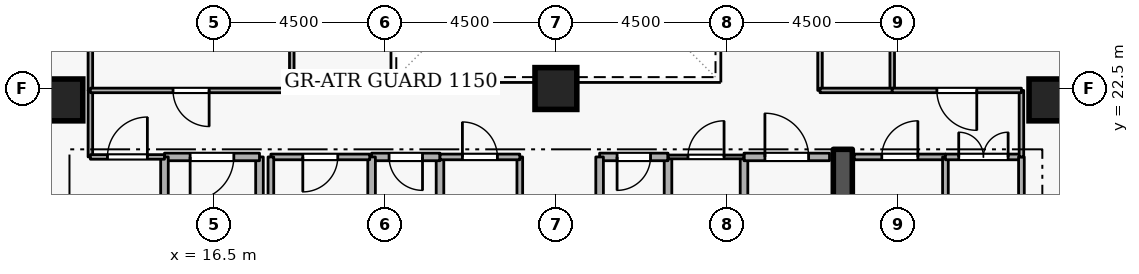
"""IFC4 building model, lengths in metres.
Left out: names, types, materials, properties, quantities, classifications, styles, units other than length and angle.
Written with IfcOpenShell. Run it as: python <this file> out.ifc"""

import sys

from ifc_helpers import new_model, si_unit, direction, frame, frame_2d, origin, origin_2d, place, context, subcontext, project, spatial, rectangle, extrude, element, fill, save


model = new_model("IFC4")
c1 = context("Model", 3, precision=1e-05, world=origin(), true_north=direction((0.0, 1.0)))
c2 = subcontext(c1, "Body", "Model", "MODEL_VIEW")
j1 = project(units=[si_unit("LENGTHUNIT", "METRE"), si_unit("PLANEANGLEUNIT", "RADIAN")], contexts=[c1])
p1 = place(None, origin())
s1 = spatial("IfcSite", under=j1, at=p1, CompositionType="ELEMENT")
p2 = place(p1, origin())
s2 = spatial("IfcBuilding", under=s1, at=p2, CompositionType="ELEMENT")
p3 = place(p2, frame((0.0, 0.0, 192.9)))
s3 = spatial("IfcBuildingStorey", under=s2, at=p3, CompositionType="ELEMENT", Elevation=192.9)
p4 = place(p3, frame((33.05, 15.1, 0.0), z_axis=(0.0, 0.0, 1.0), x_axis=(0.0, 1.0, 0.0)))
e1 = element("IfcWall", 1, at=p4, inside=s3, PredefinedType="SHEAR", context=c2, shape_type="SweptSolid", body=[
    extrude(rectangle(XDim=5.8, YDim=0.5, at=frame_2d((2.9, 0.0))), origin(), (0.0, 0.0, 1.0), 3.6),
])
for number, where, z_axis, x_axis in (
    (2, (12.5, 22.2, 0.0), (0.0, 0.0, 1.0), (1.0, 0.0, 0.0)),
    (3, (38.5, 22.2, 0.0), (0.0, 0.0, 1.0), (1.0, 0.0, 0.0)),
    (4, (25.5, 22.5, 0.0), (0.0, 0.0, 1.0), (1.0, 0.0, 0.0)),
):
    element("IfcColumn", number, at=place(p3, frame(where, z_axis=z_axis, x_axis=x_axis)), inside=s3, PredefinedType="COLUMN", context=c2, shape_type="SweptSolid", body=[
        extrude(rectangle(XDim=1.1, YDim=1.1, at=origin_2d()), origin(), (0.0, 0.0, 1.0), 3.6),
    ])
p5 = place(p3, frame((17.7, 18.4, 0.0), z_axis=(0.0, 0.0, 1.0), x_axis=(0.0, 1.0, 0.0)))
e5 = element("IfcWall", 5, at=p5, inside=s3, PredefinedType="STANDARD", context=c2, shape_type="SweptSolid", body=[
    extrude(rectangle(XDim=2.3, YDim=0.2, at=frame_2d((1.15, 0.0))), origin(), (0.0, 0.0, 1.0), 2.545),
])
p6 = place(p3, frame((17.7, 20.7, 0.0), z_axis=(0.0, 0.0, 1.0), x_axis=(-1.0, 0.0, 0.0)))
e6 = element("IfcWall", 6, at=p6, inside=s3, PredefinedType="STANDARD", context=c2, shape_type="SweptSolid", body=[
    extrude(rectangle(XDim=2.5, YDim=0.2, at=frame_2d((1.25, 0.0))), origin(), (0.0, 0.0, 1.0), 3.34),
])
p7 = place(p6, frame((0.675, 0.0, 0.0)))
e7 = element("IfcOpeningElement", 7, at=p7, cuts=e6, PredefinedType="OPENING", context=c2, shape_type="SweptSolid", body=[
    extrude(rectangle(XDim=1.15, YDim=2.1, at=frame_2d((0.575, 1.05))), frame((0.0, 0.11, 0.0), z_axis=(0.0, -1.0, 0.0), x_axis=(1.0, 0.0, 0.0)), (0.0, 0.0, 1.0), 0.22),
])
p8 = place(p3, frame((15.2, 20.7, 0.0), z_axis=(0.0, 0.0, 1.0), x_axis=(0.0, -1.0, 0.0)))
e8 = element("IfcWall", 8, at=p8, inside=s3, PredefinedType="STANDARD", context=c2, shape_type="SweptSolid", body=[
    extrude(rectangle(XDim=5.7, YDim=0.2, at=frame_2d((2.85, 0.0))), origin(), (0.0, 0.0, 1.0), 3.34),
])
p9 = place(p3, frame((28.45, 18.65, 0.0), z_axis=(0.0, 0.0, 1.0), x_axis=(0.0, 1.0, 0.0)))
e9 = element("IfcWall", 9, at=p9, inside=s3, PredefinedType="STANDARD", context=c2, shape_type="SweptSolid", body=[
    extrude(rectangle(XDim=2.05, YDim=0.2, at=frame_2d((1.025, 0.0))), origin(), (0.0, 0.0, 1.0), 3.34),
])
p10 = place(p3, frame((28.45, 20.7, 0.0), z_axis=(0.0, 0.0, 1.0), x_axis=(-1.0, 0.0, 0.0)))
e10 = element("IfcWall", 10, at=p10, inside=s3, PredefinedType="STANDARD", context=c2, shape_type="SweptSolid", body=[
    extrude(rectangle(XDim=1.8, YDim=0.2, at=frame_2d((0.9, 0.0))), origin(), (0.0, 0.0, 1.0), 3.34),
])
p11 = place(p10, frame((0.46, 0.0, 0.0)))
e11 = element("IfcOpeningElement", 11, at=p11, cuts=e10, PredefinedType="OPENING", context=c2, shape_type="SweptSolid", body=[
    extrude(rectangle(XDim=0.88, YDim=2.04, at=frame_2d((0.44, 1.02))), frame((0.0, 0.11, 0.0), z_axis=(0.0, -1.0, 0.0), x_axis=(1.0, 0.0, 0.0)), (0.0, 0.0, 1.0), 0.22),
])
for number, where, z_axis, x_axis in (
    (12, (26.65, 20.7, 0.0), (0.0, 0.0, 1.0), (0.0, -1.0, 0.0)),
    (13, (22.45, 18.65, 0.0), (0.0, 0.0, 1.0), (0.0, 1.0, 0.0)),
):
    element("IfcWall", number, at=place(p3, frame(where, z_axis=z_axis, x_axis=x_axis)), inside=s3, PredefinedType="STANDARD", context=c2, shape_type="SweptSolid", body=[
        extrude(rectangle(XDim=2.05, YDim=0.2, at=frame_2d((1.025, 0.0))), origin(), (0.0, 0.0, 1.0), 3.34),
    ])
p12 = place(p3, frame((22.45, 20.7, 0.0), z_axis=(0.0, 0.0, 1.0), x_axis=(-1.0, 0.0, 0.0)))
e14 = element("IfcWall", 14, at=p12, inside=s3, PredefinedType="STANDARD", context=c2, shape_type="SweptSolid", body=[
    extrude(rectangle(XDim=1.8, YDim=0.2, at=frame_2d((0.9, 0.0))), origin(), (0.0, 0.0, 1.0), 3.34),
])
p13 = place(p12, frame((0.46, 0.0, 0.0)))
e15 = element("IfcOpeningElement", 15, at=p13, cuts=e14, PredefinedType="OPENING", context=c2, shape_type="SweptSolid", body=[
    extrude(rectangle(XDim=0.88, YDim=2.04, at=frame_2d((0.44, 1.02))), frame((0.0, 0.11, 0.0), z_axis=(0.0, -1.0, 0.0), x_axis=(1.0, 0.0, 0.0)), (0.0, 0.0, 1.0), 0.22),
])
for number, where, z_axis, x_axis in (
    (16, (20.65, 20.7, 0.0), (0.0, 0.0, 1.0), (0.0, -1.0, 0.0)),
    (17, (30.45, 18.65, 0.0), (0.0, 0.0, 1.0), (0.0, 1.0, 0.0)),
):
    element("IfcWall", number, at=place(p3, frame(where, z_axis=z_axis, x_axis=x_axis)), inside=s3, PredefinedType="STANDARD", context=c2, shape_type="SweptSolid", body=[
        extrude(rectangle(XDim=2.05, YDim=0.2, at=frame_2d((1.025, 0.0))), origin(), (0.0, 0.0, 1.0), 3.34),
    ])
p14 = place(p3, frame((30.45, 20.7, 0.0), z_axis=(0.0, 0.0, 1.0), x_axis=(1.0, 0.0, 0.0)))
e18 = element("IfcWall", 18, at=p14, inside=s3, PredefinedType="STANDARD", context=c2, shape_type="SweptSolid", body=[
    extrude(rectangle(XDim=2.25, YDim=0.2, at=frame_2d((1.125, 0.0))), origin(), (0.0, 0.0, 1.0), 3.34),
])
p15 = place(p14, frame((0.55, 0.0, 0.0)))
e19 = element("IfcOpeningElement", 19, at=p15, cuts=e18, PredefinedType="OPENING", context=c2, shape_type="SweptSolid", body=[
    extrude(rectangle(XDim=1.15, YDim=2.1, at=frame_2d((0.575, 1.05))), frame((0.0, 0.11, 0.0), z_axis=(0.0, -1.0, 0.0), x_axis=(1.0, 0.0, 0.0)), (0.0, 0.0, 1.0), 0.22),
])
p16 = place(p3, frame((20.6, 20.7, 0.0), z_axis=(0.0, 0.0, 1.0), x_axis=(-1.0, 0.0, 0.0)))
e20 = element("IfcWall", 20, at=p16, inside=s3, PredefinedType="PARTITIONING", context=c2, shape_type="SweptSolid", body=[
    extrude(rectangle(XDim=2.6, YDim=0.15, at=frame_2d((1.3, 0.0))), origin(), (0.0, 0.0, 1.0), 3.34),
])
p17 = place(p16, frame((0.84, 0.0, 0.0)))
e21 = element("IfcOpeningElement", 21, at=p17, cuts=e20, PredefinedType="OPENING", context=c2, shape_type="SweptSolid", body=[
    extrude(rectangle(XDim=0.92, YDim=2.08, at=frame_2d((0.46, 1.04))), frame((0.0, 0.085, 0.0), z_axis=(0.0, -1.0, 0.0), x_axis=(1.0, 0.0, 0.0)), (0.0, 0.0, 1.0), 0.17),
])
p18 = place(p3, frame((18.0, 20.7, 0.0), z_axis=(0.0, 0.0, 1.0), x_axis=(0.0, -1.0, 0.0)))
e22 = element("IfcWall", 22, at=p18, inside=s3, PredefinedType="PARTITIONING", context=c2, shape_type="SweptSolid", body=[
    extrude(rectangle(XDim=2.05, YDim=0.15, at=frame_2d((1.025, 0.0))), origin(), (0.0, 0.0, 1.0), 2.545),
])
p19 = place(p3, frame((24.55, 20.7, 0.0), z_axis=(0.0, 0.0, 1.0), x_axis=(0.0, -1.0, 0.0)))
e23 = element("IfcWall", 23, at=p19, inside=s3, PredefinedType="PARTITIONING", context=c2, shape_type="SweptSolid", body=[
    extrude(rectangle(XDim=2.05, YDim=0.15, at=frame_2d((1.025, 0.0))), origin(), (0.0, 0.0, 1.0), 3.34),
])
p20 = place(p3, frame((22.45, 20.7, 0.0), z_axis=(0.0, 0.0, 1.0), x_axis=(1.0, 0.0, 0.0)))
e24 = element("IfcWall", 24, at=p20, inside=s3, PredefinedType="PARTITIONING", context=c2, shape_type="SweptSolid", body=[
    extrude(rectangle(XDim=2.1, YDim=0.15, at=frame_2d((1.05, 0.0))), origin(), (0.0, 0.0, 1.0), 3.34),
])
p21 = place(p20, frame((0.59, 0.0, 0.0)))
e25 = element("IfcOpeningElement", 25, at=p21, cuts=e24, PredefinedType="OPENING", context=c2, shape_type="SweptSolid", body=[
    extrude(rectangle(XDim=0.92, YDim=2.08, at=frame_2d((0.46, 1.04))), frame((0.0, 0.085, 0.0), z_axis=(0.0, -1.0, 0.0), x_axis=(1.0, 0.0, 0.0)), (0.0, 0.0, 1.0), 0.17),
])
p22 = place(p3, frame((28.45, 20.7, 0.0), z_axis=(0.0, 0.0, 1.0), x_axis=(1.0, 0.0, 0.0)))
e26 = element("IfcWall", 26, at=p22, inside=s3, PredefinedType="PARTITIONING", context=c2, shape_type="SweptSolid", body=[
    extrude(rectangle(XDim=2.0, YDim=0.1, at=frame_2d((1.0, 0.0))), origin(), (0.0, 0.0, 1.0), 3.34),
])
p23 = place(p22, frame((0.525, 0.0, 0.0)))
e27 = element("IfcOpeningElement", 27, at=p23, cuts=e26, PredefinedType="OPENING", context=c2, shape_type="SweptSolid", body=[
    extrude(rectangle(XDim=0.95, YDim=2.1, at=frame_2d((0.475, 1.05))), frame((0.0, 0.06, 0.0), z_axis=(0.0, -1.0, 0.0), x_axis=(1.0, 0.0, 0.0)), (0.0, 0.0, 1.0), 0.12),
])
p24 = place(p3, frame((33.35, 20.7, 0.0), z_axis=(0.0, 0.0, 1.0), x_axis=(1.0, 0.0, 0.0)))
e28 = element("IfcWall", 28, at=p24, inside=s3, PredefinedType="PARTITIONING", context=c2, shape_type="SweptSolid", body=[
    extrude(rectangle(XDim=2.4, YDim=0.15, at=frame_2d((1.2, 0.0))), origin(), (0.0, 0.0, 1.0), 3.34),
])
p25 = place(p24, frame((0.725, 0.0, 0.0)))
e29 = element("IfcOpeningElement", 29, at=p25, cuts=e28, PredefinedType="OPENING", context=c2, shape_type="SweptSolid", body=[
    extrude(rectangle(XDim=0.95, YDim=2.1, at=frame_2d((0.475, 1.05))), frame((0.0, 0.085, 0.0), z_axis=(0.0, -1.0, 0.0), x_axis=(1.0, 0.0, 0.0)), (0.0, 0.0, 1.0), 0.17),
])
p26 = place(p3, frame((35.75, 20.7, 0.0), z_axis=(0.0, 0.0, 1.0), x_axis=(0.0, -1.0, 0.0)))
e30 = element("IfcWall", 30, at=p26, inside=s3, PredefinedType="PARTITIONING", context=c2, shape_type="SweptSolid", body=[
    extrude(rectangle(XDim=5.65, YDim=0.15, at=frame_2d((2.825, 0.0))), origin(), (0.0, 0.0, 1.0), 3.34),
])
p27 = place(p3, frame((35.75, 20.7, 0.0), z_axis=(0.0, 0.0, 1.0), x_axis=(1.0, 0.0, 0.0)))
e31 = element("IfcWall", 31, at=p27, inside=s3, PredefinedType="PARTITIONING", context=c2, shape_type="SweptSolid", body=[
    extrude(rectangle(XDim=2.0, YDim=0.15, at=frame_2d((1.0, 0.0))), origin(), (0.0, 0.0, 1.0), 3.34),
])
p28 = place(p27, frame((0.35, 0.0, 0.0)))
e32 = element("IfcOpeningElement", 32, at=p28, cuts=e31, PredefinedType="OPENING", context=c2, shape_type="SweptSolid", body=[
    extrude(rectangle(XDim=1.3, YDim=2.12, at=frame_2d((0.65, 1.06))), frame((0.0, 0.085, 0.0), z_axis=(0.0, -1.0, 0.0), x_axis=(1.0, 0.0, 0.0)), (0.0, 0.0, 1.0), 0.17),
])
p29 = place(p3, frame((37.75, 20.7, 0.0), z_axis=(0.0, 0.0, 1.0), x_axis=(0.0, -1.0, 0.0)))
e33 = element("IfcWall", 33, at=p29, inside=s3, PredefinedType="PARTITIONING", context=c2, shape_type="SweptSolid", body=[
    extrude(rectangle(XDim=5.65, YDim=0.15, at=frame_2d((2.825, 0.0))), origin(), (0.0, 0.0, 1.0), 3.34),
])
p30 = place(p3, frame((13.25, 27.0, 0.0), z_axis=(0.0, 0.0, 1.0), x_axis=(0.0, -1.0, 0.0)))
e34 = element("IfcWall", 34, at=p30, inside=s3, PredefinedType="PARTITIONING", context=c2, shape_type="SweptSolid", body=[
    extrude(rectangle(XDim=4.55, YDim=0.12, at=frame_2d((2.275, 0.0))), origin(), (0.0, 0.0, 1.0), 3.34),
])
p31 = place(p3, frame((13.25, 22.45, 0.0), z_axis=(0.0, 0.0, 1.0), x_axis=(0.0, -1.0, 0.0)))
e35 = element("IfcWall", 35, at=p31, inside=s3, PredefinedType="PARTITIONING", context=c2, shape_type="SweptSolid", body=[
    extrude(rectangle(XDim=1.75, YDim=0.12, at=frame_2d((0.875, 0.0))), origin(), (0.0, 0.0, 1.0), 3.34),
])
p32 = place(p3, frame((13.25, 20.7, 0.0), z_axis=(0.0, 0.0, 1.0), x_axis=(1.0, 0.0, 0.0)))
e36 = element("IfcWall", 36, at=p32, inside=s3, PredefinedType="PARTITIONING", context=c2, shape_type="SweptSolid", body=[
    extrude(rectangle(XDim=1.95, YDim=0.12, at=frame_2d((0.975, 0.0))), origin(), (0.0, 0.0, 1.0), 3.34),
])
p33 = place(p32, frame((0.45, 0.0, 0.0)))
e37 = element("IfcOpeningElement", 37, at=p33, cuts=e36, PredefinedType="OPENING", context=c2, shape_type="SweptSolid", body=[
    extrude(rectangle(XDim=1.05, YDim=2.1, at=frame_2d((0.525, 1.05))), frame((0.0, 0.07, 0.0), z_axis=(0.0, -1.0, 0.0), x_axis=(1.0, 0.0, 0.0)), (0.0, 0.0, 1.0), 0.14),
])
p34 = place(p3, frame((18.55, 27.0, 0.0), z_axis=(0.0, 0.0, 1.0), x_axis=(0.0, -1.0, 0.0)))
e38 = element("IfcWall", 38, at=p34, inside=s3, PredefinedType="PARTITIONING", context=c2, shape_type="SweptSolid", body=[
    extrude(rectangle(XDim=4.55, YDim=0.12, at=frame_2d((2.275, 0.0))), origin(), (0.0, 0.0, 1.0), 3.34),
])
p35 = place(p3, frame((18.55, 22.45, 0.0), z_axis=(0.0, 0.0, 1.0), x_axis=(-1.0, 0.0, 0.0)))
e39 = element("IfcWall", 39, at=p35, inside=s3, PredefinedType="PARTITIONING", context=c2, shape_type="SweptSolid", body=[
    extrude(rectangle(XDim=5.3, YDim=0.12, at=frame_2d((2.65, 0.0))), origin(), (0.0, 0.0, 1.0), 3.34),
])
p36 = place(p35, frame((2.175, 0.0, 0.0)))
e40 = element("IfcOpeningElement", 40, at=p36, cuts=e39, PredefinedType="OPENING", context=c2, shape_type="SweptSolid", body=[
    extrude(rectangle(XDim=0.95, YDim=2.1, at=frame_2d((0.475, 1.05))), frame((0.0, 0.07, 0.0), z_axis=(0.0, -1.0, 0.0), x_axis=(1.0, 0.0, 0.0)), (0.0, 0.0, 1.0), 0.14),
])
p37 = place(p3, frame((32.45, 22.45, 0.0), z_axis=(0.0, 0.0, 1.0), x_axis=(0.0, 1.0, 0.0)))
e41 = element("IfcWall", 41, at=p37, inside=s3, PredefinedType="PARTITIONING", context=c2, shape_type="SweptSolid", body=[
    extrude(rectangle(XDim=4.55, YDim=0.12, at=frame_2d((2.275, 0.0))), origin(), (0.0, 0.0, 1.0), 3.34),
])
p38 = place(p37, frame((1.8, 0.0, 0.0)))
e42 = element("IfcOpeningElement", 42, at=p38, cuts=e41, PredefinedType="OPENING", context=c2, shape_type="SweptSolid", body=[
    extrude(rectangle(XDim=0.95, YDim=2.1, at=frame_2d((0.475, 1.05))), frame((0.0, 0.07, 0.0), z_axis=(0.0, -1.0, 0.0), x_axis=(1.0, 0.0, 0.0)), (0.0, 0.0, 1.0), 0.14),
])
p39 = place(p3, frame((34.35, 27.0, 0.0), z_axis=(0.0, 0.0, 1.0), x_axis=(0.0, -1.0, 0.0)))
e43 = element("IfcWall", 43, at=p39, inside=s3, PredefinedType="PARTITIONING", context=c2, shape_type="SweptSolid", body=[
    extrude(rectangle(XDim=4.55, YDim=0.12, at=frame_2d((2.275, 0.0))), origin(), (0.0, 0.0, 1.0), 3.34),
])
p40 = place(p3, frame((34.35, 22.45, 0.0), z_axis=(0.0, 0.0, 1.0), x_axis=(-1.0, 0.0, 0.0)))
e44 = element("IfcWall", 44, at=p40, inside=s3, PredefinedType="PARTITIONING", context=c2, shape_type="SweptSolid", body=[
    extrude(rectangle(XDim=1.9, YDim=0.12, at=frame_2d((0.95, 0.0))), origin(), (0.0, 0.0, 1.0), 3.34),
])
p41 = place(p3, frame((37.75, 20.7, 0.0), z_axis=(0.0, 0.0, 1.0), x_axis=(0.0, 1.0, 0.0)))
e45 = element("IfcWall", 45, at=p41, inside=s3, PredefinedType="PARTITIONING", context=c2, shape_type="SweptSolid", body=[
    extrude(rectangle(XDim=1.75, YDim=0.12, at=frame_2d((0.875, 0.0))), origin(), (0.0, 0.0, 1.0), 3.34),
])
p42 = place(p3, frame((37.75, 22.45, 0.0), z_axis=(0.0, 0.0, 1.0), x_axis=(-1.0, 0.0, 0.0)))
e46 = element("IfcWall", 46, at=p42, inside=s3, PredefinedType="PARTITIONING", context=c2, shape_type="SweptSolid", body=[
    extrude(rectangle(XDim=3.4, YDim=0.12, at=frame_2d((1.7, 0.0))), origin(), (0.0, 0.0, 1.0), 3.34),
])
p43 = place(p42, frame((1.175, 0.0, 0.0)))
e47 = element("IfcOpeningElement", 47, at=p43, cuts=e46, PredefinedType="OPENING", context=c2, shape_type="SweptSolid", body=[
    extrude(rectangle(XDim=1.05, YDim=2.1, at=frame_2d((0.525, 1.05))), frame((0.0, 0.07, 0.0), z_axis=(0.0, -1.0, 0.0), x_axis=(1.0, 0.0, 0.0)), (0.0, 0.0, 1.0), 0.14),
])
p44 = place(p7, origin())
e48 = element("IfcDoor", 48, at=p44, inside=s3, OperationType="SINGLE_SWING_RIGHT", PredefinedType="DOOR", context=c2, shape_type="SweptSolid", body=[
    extrude(rectangle(XDim=1.15, YDim=2.1, at=frame_2d((0.575, 1.05))), frame((0.0, 0.025, 0.0), z_axis=(0.0, -1.0, 0.0), x_axis=(1.0, 0.0, 0.0)), (0.0, 0.0, 1.0), 0.05),
])
fill(e7, e48)
p45 = place(p11, origin())
e49 = element("IfcDoor", 49, at=p45, inside=s3, OperationType="SINGLE_SWING_RIGHT", PredefinedType="DOOR", context=c2, shape_type="SweptSolid", body=[
    extrude(rectangle(XDim=0.88, YDim=2.04, at=frame_2d((0.44, 1.02))), frame((0.0, 0.025, 0.0), z_axis=(0.0, -1.0, 0.0), x_axis=(1.0, 0.0, 0.0)), (0.0, 0.0, 1.0), 0.05),
])
fill(e11, e49)
p46 = place(p13, origin())
e50 = element("IfcDoor", 50, at=p46, inside=s3, OperationType="SINGLE_SWING_LEFT", PredefinedType="DOOR", context=c2, shape_type="SweptSolid", body=[
    extrude(rectangle(XDim=0.88, YDim=2.04, at=frame_2d((0.44, 1.02))), frame((0.0, 0.025, 0.0), z_axis=(0.0, -1.0, 0.0), x_axis=(1.0, 0.0, 0.0)), (0.0, 0.0, 1.0), 0.05),
])
fill(e15, e50)
p47 = place(p17, origin())
e51 = element("IfcDoor", 51, at=p47, inside=s3, OperationType="SINGLE_SWING_RIGHT", PredefinedType="DOOR", context=c2, shape_type="SweptSolid", body=[
    extrude(rectangle(XDim=0.92, YDim=2.08, at=frame_2d((0.46, 1.04))), frame((0.0, 0.025, 0.0), z_axis=(0.0, -1.0, 0.0), x_axis=(1.0, 0.0, 0.0)), (0.0, 0.0, 1.0), 0.05),
])
fill(e21, e51)
p48 = place(p21, origin())
e52 = element("IfcDoor", 52, at=p48, inside=s3, OperationType="SINGLE_SWING_LEFT", PredefinedType="DOOR", context=c2, shape_type="SweptSolid", body=[
    extrude(rectangle(XDim=0.92, YDim=2.08, at=frame_2d((0.46, 1.04))), frame((0.0, 0.025, 0.0), z_axis=(0.0, -1.0, 0.0), x_axis=(1.0, 0.0, 0.0)), (0.0, 0.0, 1.0), 0.05),
])
fill(e25, e52)
p49 = place(p23, origin())
e53 = element("IfcDoor", 53, at=p49, inside=s3, OperationType="SINGLE_SWING_RIGHT", PredefinedType="DOOR", context=c2, shape_type="SweptSolid", body=[
    extrude(rectangle(XDim=0.95, YDim=2.1, at=frame_2d((0.475, 1.05))), frame((0.0, 0.025, 0.0), z_axis=(0.0, -1.0, 0.0), x_axis=(1.0, 0.0, 0.0)), (0.0, 0.0, 1.0), 0.05),
])
fill(e27, e53)
p50 = place(p15, origin())
e54 = element("IfcDoor", 54, at=p50, inside=s3, OperationType="SINGLE_SWING_LEFT", PredefinedType="DOOR", context=c2, shape_type="SweptSolid", body=[
    extrude(rectangle(XDim=1.15, YDim=2.1, at=frame_2d((0.575, 1.05))), frame((0.0, 0.025, 0.0), z_axis=(0.0, -1.0, 0.0), x_axis=(1.0, 0.0, 0.0)), (0.0, 0.0, 1.0), 0.05),
])
fill(e19, e54)
p51 = place(p25, origin())
e55 = element("IfcDoor", 55, at=p51, inside=s3, OperationType="SINGLE_SWING_RIGHT", PredefinedType="DOOR", context=c2, shape_type="SweptSolid", body=[
    extrude(rectangle(XDim=0.95, YDim=2.1, at=frame_2d((0.475, 1.05))), frame((0.0, 0.025, 0.0), z_axis=(0.0, -1.0, 0.0), x_axis=(1.0, 0.0, 0.0)), (0.0, 0.0, 1.0), 0.05),
])
fill(e29, e55)
p52 = place(p28, origin())
e56 = element("IfcDoor", 56, at=p52, inside=s3, OperationType="DOUBLE_DOOR_SINGLE_SWING", PredefinedType="DOOR", context=c2, shape_type="SweptSolid", body=[
    extrude(rectangle(XDim=1.3, YDim=2.12, at=frame_2d((0.65, 1.06))), frame((0.0, 0.025, 0.0), z_axis=(0.0, -1.0, 0.0), x_axis=(1.0, 0.0, 0.0)), (0.0, 0.0, 1.0), 0.05),
])
fill(e32, e56)
p53 = place(p33, origin())
e57 = element("IfcDoor", 57, at=p53, inside=s3, OperationType="SINGLE_SWING_RIGHT", PredefinedType="DOOR", context=c2, shape_type="SweptSolid", body=[
    extrude(rectangle(XDim=1.05, YDim=2.1, at=frame_2d((0.525, 1.05))), frame((0.0, 0.025, 0.0), z_axis=(0.0, -1.0, 0.0), x_axis=(1.0, 0.0, 0.0)), (0.0, 0.0, 1.0), 0.05),
])
fill(e37, e57)
p54 = place(p36, origin())
e58 = element("IfcDoor", 58, at=p54, inside=s3, OperationType="SINGLE_SWING_LEFT", PredefinedType="DOOR", context=c2, shape_type="SweptSolid", body=[
    extrude(rectangle(XDim=0.95, YDim=2.1, at=frame_2d((0.475, 1.05))), frame((0.0, 0.025, 0.0), z_axis=(0.0, -1.0, 0.0), x_axis=(1.0, 0.0, 0.0)), (0.0, 0.0, 1.0), 0.05),
])
fill(e40, e58)
p55 = place(p43, origin())
e59 = element("IfcDoor", 59, at=p55, inside=s3, OperationType="SINGLE_SWING_LEFT", PredefinedType="DOOR", context=c2, shape_type="SweptSolid", body=[
    extrude(rectangle(XDim=1.05, YDim=2.1, at=frame_2d((0.525, 1.05))), frame((0.0, 0.025, 0.0), z_axis=(0.0, -1.0, 0.0), x_axis=(1.0, 0.0, 0.0)), (0.0, 0.0, 1.0), 0.05),
])
fill(e47, e59)
save(model, sys.argv[1])
